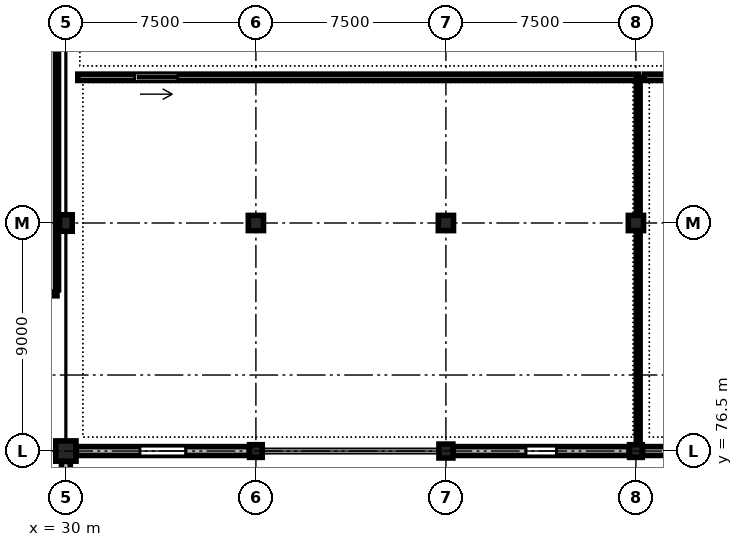
"""IFC4 building model, lengths in metres.
Left out: names, types, materials, properties, quantities, classifications, styles, units other than length and angle.
Written with IfcOpenShell. Run it as: python <this file> out.ifc"""

import sys

from ifc_helpers import new_model, si_unit, direction, frame, frame_2d, origin, origin_2d, place, context, subcontext, project, spatial, rectangle, circle, extrude, element, fill, save


model = new_model("IFC4")
c1 = context("Model", 3, precision=1e-05, world=origin(), true_north=direction((0.0, 1.0)))
c2 = subcontext(c1, "Body", "Model", "MODEL_VIEW")
j1 = project(units=[si_unit("LENGTHUNIT", "METRE"), si_unit("PLANEANGLEUNIT", "RADIAN")], contexts=[c1])
p1 = place(None, origin())
s1 = spatial("IfcSite", under=j1, at=p1, CompositionType="ELEMENT")
p2 = place(p1, origin())
s2 = spatial("IfcBuilding", under=s1, at=p2, CompositionType="ELEMENT")
p3 = place(p2, frame((0.0, 0.0, 9.3)))
s3 = spatial("IfcBuildingStorey", under=s2, at=p3, CompositionType="ELEMENT", Elevation=9.3)
p4 = place(p3, frame((30.0, 76.5, 0.0), z_axis=(0.0, 0.0, 1.0), x_axis=(1.0, 0.0, 0.0)))
e1 = element("IfcColumn", 1, at=p4, inside=s3, PredefinedType="COLUMN", context=c2, shape_type="SweptSolid", body=[
    extrude(rectangle(XDim=0.8, YDim=0.8, at=origin_2d()), origin(), (0.0, 0.0, 1.0), 4.8),
])
p5 = place(p3, frame((30.0, 85.5, 0.0), z_axis=(0.0, 0.0, 1.0), x_axis=(1.0, 0.0, 0.0)))
e2 = element("IfcColumn", 2, at=p5, inside=s3, PredefinedType="COLUMN", context=c2, shape_type="SweptSolid", body=[
    extrude(rectangle(XDim=0.5, YDim=0.65, at=origin_2d()), origin(), (0.0, 0.0, 1.0), 4.8),
])
p6 = place(p3, frame((37.5, 76.5, 0.0), z_axis=(0.0, 0.0, 1.0), x_axis=(1.0, 0.0, 0.0)))
e3 = element("IfcColumn", 3, at=p6, inside=s3, PredefinedType="COLUMN", context=c2, shape_type="SweptSolid", body=[
    extrude(rectangle(XDim=0.5, YDim=0.5, at=origin_2d()), origin(), (0.0, 0.0, 1.0), 4.8),
])
p7 = place(p3, frame((37.5, 85.5, 0.0), z_axis=(0.0, 0.0, 1.0), x_axis=(1.0, 0.0, 0.0)))
e4 = element("IfcColumn", 4, at=p7, inside=s3, PredefinedType="COLUMN", context=c2, shape_type="SweptSolid", body=[
    extrude(rectangle(XDim=0.6, YDim=0.6, at=origin_2d()), origin(), (0.0, 0.0, 1.0), 4.8),
])
p8 = place(p3, frame((45.0, 76.5, 0.0), z_axis=(0.0, 0.0, 1.0), x_axis=(1.0, 0.0, 0.0)))
e5 = element("IfcColumn", 5, at=p8, inside=s3, PredefinedType="COLUMN", context=c2, shape_type="SweptSolid", body=[
    extrude(rectangle(XDim=0.55, YDim=0.55, at=origin_2d()), origin(), (0.0, 0.0, 1.0), 4.8),
])
p9 = place(p3, frame((45.0, 85.5, 0.0), z_axis=(0.0, 0.0, 1.0), x_axis=(1.0, 0.0, 0.0)))
e6 = element("IfcColumn", 6, at=p9, inside=s3, PredefinedType="COLUMN", context=c2, shape_type="SweptSolid", body=[
    extrude(rectangle(XDim=0.6, YDim=0.6, at=origin_2d()), origin(), (0.0, 0.0, 1.0), 4.8),
])
p10 = place(p3, frame((52.5, 76.5, 0.0), z_axis=(0.0, 0.0, 1.0), x_axis=(1.0, 0.0, 0.0)))
e7 = element("IfcColumn", 7, at=p10, inside=s3, PredefinedType="COLUMN", context=c2, shape_type="SweptSolid", body=[
    extrude(rectangle(XDim=0.5, YDim=0.5, at=origin_2d()), origin(), (0.0, 0.0, 1.0), 4.8),
])
p11 = place(p3, frame((52.5, 85.5, 0.0), z_axis=(0.0, 0.0, 1.0), x_axis=(1.0, 0.0, 0.0)))
e8 = element("IfcColumn", 8, at=p11, inside=s3, PredefinedType="COLUMN", context=c2, shape_type="SweptSolid", body=[
    extrude(circle(Radius=0.3, at=origin_2d()), origin(), (0.0, 0.0, 1.0), 4.8),
])
p12 = place(p3, frame((30.0, 76.09, 0.0), z_axis=(0.0, 0.0, 1.0), x_axis=(0.0, -1.0, 0.0)))
e9 = element("IfcWall", 9, at=p12, inside=s3, PredefinedType="STANDARD", context=c2, shape_type="SweptSolid", body=[
    extrude(rectangle(XDim=6.92, YDim=0.35, at=frame_2d((3.46, 0.0))), origin(), (0.0, 0.0, 1.0), 3.95),
])
p13 = place(p12, frame((2.26, 0.0, 0.9)))
e10 = element("IfcOpeningElement", 10, at=p13, cuts=e9, PredefinedType="OPENING", context=c2, shape_type="SweptSolid", body=[
    extrude(rectangle(XDim=2.4, YDim=2.5, at=frame_2d((1.2, 1.25))), frame((0.0, 0.185, 0.0), z_axis=(0.0, -1.0, 0.0), x_axis=(1.0, 0.0, 0.0)), (0.0, 0.0, 1.0), 0.37),
])
p14 = place(p3, frame((37.24, 76.5, 0.0), z_axis=(0.0, 0.0, 1.0), x_axis=(-1.0, 0.0, 0.0)))
e11 = element("IfcWall", 11, at=p14, inside=s3, PredefinedType="STANDARD", context=c2, shape_type="SweptSolid", body=[
    extrude(rectangle(XDim=6.83, YDim=0.35, at=frame_2d((3.415, 0.0))), origin(), (0.0, 0.0, 1.0), 3.95),
])
p15 = place(p14, frame((2.515, 0.0, 0.9)))
e12 = element("IfcOpeningElement", 12, at=p15, cuts=e11, PredefinedType="OPENING", context=c2, shape_type="SweptSolid", body=[
    extrude(rectangle(XDim=1.8, YDim=2.1, at=frame_2d((0.9, 1.05))), frame((0.0, 0.185, 0.0), z_axis=(0.0, -1.0, 0.0), x_axis=(1.0, 0.0, 0.0)), (0.0, 0.0, 1.0), 0.37),
])
p16 = place(p3, frame((52.24, 76.5, 0.0), z_axis=(0.0, 0.0, 1.0), x_axis=(-1.0, 0.0, 0.0)))
e13 = element("IfcWall", 13, at=p16, inside=s3, PredefinedType="STANDARD", context=c2, shape_type="SweptSolid", body=[
    extrude(rectangle(XDim=6.955, YDim=0.35, at=frame_2d((3.478, 0.0))), origin(), (0.0, 0.0, 1.0), 3.95),
])
p17 = place(p16, frame((2.877, 0.0, 0.9)))
e14 = element("IfcOpeningElement", 14, at=p17, cuts=e13, PredefinedType="OPENING", context=c2, shape_type="SweptSolid", body=[
    extrude(rectangle(XDim=1.2, YDim=2.1, at=frame_2d((0.6, 1.05))), frame((0.0, 0.185, 0.0), z_axis=(0.0, -1.0, 0.0), x_axis=(1.0, 0.0, 0.0)), (0.0, 0.0, 1.0), 0.37),
])
p18 = place(p3, frame((59.715, 76.5, 0.0), z_axis=(0.0, 0.0, 1.0), x_axis=(-1.0, 0.0, 0.0)))
e15 = element("IfcWall", 15, at=p18, inside=s3, PredefinedType="STANDARD", context=c2, shape_type="SweptSolid", body=[
    extrude(rectangle(XDim=6.955, YDim=0.35, at=frame_2d((3.478, 0.0))), origin(), (0.0, 0.0, 1.0), 3.95),
])
p19 = place(p18, frame((2.427, 0.0, 0.9)))
e16 = element("IfcOpeningElement", 16, at=p19, cuts=e15, PredefinedType="OPENING", context=c2, shape_type="SweptSolid", body=[
    extrude(rectangle(XDim=2.1, YDim=2.1, at=frame_2d((1.05, 1.05))), frame((0.0, 0.185, 0.0), z_axis=(0.0, -1.0, 0.0), x_axis=(1.0, 0.0, 0.0)), (0.0, 0.0, 1.0), 0.37),
])
p20 = place(p3, frame((52.59, 91.25, 0.0), z_axis=(0.0, 0.0, 1.0), x_axis=(-1.0, 0.0, 0.0)))
e17 = element("IfcWall", 17, at=p20, inside=s3, PredefinedType="STANDARD", context=c2, shape_type="SweptSolid", body=[
    extrude(rectangle(XDim=22.12, YDim=0.25, at=frame_2d((11.06, 0.0))), origin(), (0.0, 0.0, 1.0), 4.535),
])
p21 = place(p20, frame((18.178, 0.0, 0.0)))
e18 = element("IfcOpeningElement", 18, at=p21, cuts=e17, PredefinedType="OPENING", context=c2, shape_type="SweptSolid", body=[
    extrude(rectangle(XDim=1.7, YDim=2.4, at=frame_2d((0.85, 1.2))), frame((0.0, 0.135, 0.0), z_axis=(0.0, -1.0, 0.0), x_axis=(1.0, 0.0, 0.0)), (0.0, 0.0, 1.0), 0.27),
])
p22 = place(p3, frame((74.95, 91.25, 0.0), z_axis=(0.0, 0.0, 1.0), x_axis=(-1.0, 0.0, 0.0)))
e19 = element("IfcWall", 19, at=p22, inside=s3, PredefinedType="STANDARD", context=c2, shape_type="SweptSolid", body=[
    extrude(rectangle(XDim=22.12, YDim=0.25, at=frame_2d((11.06, 0.0))), origin(), (0.0, 0.0, 1.0), 4.535),
])
p23 = place(p22, frame((10.21, 0.0, 0.0)))
e20 = element("IfcOpeningElement", 20, at=p23, cuts=e19, PredefinedType="OPENING", context=c2, shape_type="SweptSolid", body=[
    extrude(rectangle(XDim=1.7, YDim=2.4, at=frame_2d((0.85, 1.2))), frame((0.0, 0.135, 0.0), z_axis=(0.0, -1.0, 0.0), x_axis=(1.0, 0.0, 0.0)), (0.0, 0.0, 1.0), 0.27),
])
p24 = place(p3, frame((18.45, 82.701, 0.0), z_axis=(0.0, 0.0, 1.0), x_axis=(1.0, 0.0, 0.0)))
e21 = element("IfcWall", 21, at=p24, inside=s3, PredefinedType="PARTITIONING", context=c2, shape_type="SweptSolid", body=[
    extrude(rectangle(XDim=11.2, YDim=0.15, at=frame_2d((5.6, 0.0))), origin(), (0.0, 0.0, 1.0), 4.535),
])
p25 = place(p3, frame((52.59, 76.85, 0.0), z_axis=(0.0, 0.0, 1.0), x_axis=(0.0, 1.0, 0.0)))
e22 = element("IfcWall", 22, at=p25, inside=s3, PredefinedType="PARTITIONING", context=c2, shape_type="SweptSolid", body=[
    extrude(rectangle(XDim=14.4, YDim=0.15, at=frame_2d((7.2, 0.0))), origin(), (0.0, 0.0, 1.0), 3.835),
])
p26 = place(p3, frame((29.65, 82.861, 0.0), z_axis=(0.0, 0.0, 1.0), x_axis=(0.0, 1.0, 0.0)))
e23 = element("IfcWall", 23, at=p26, inside=s3, PredefinedType="PARTITIONING", context=c2, shape_type="SweptSolid", body=[
    extrude(rectangle(XDim=9.709, YDim=0.12, at=frame_2d((4.854, 0.0))), origin(), (0.0, 0.0, 1.0), 3.835),
])
p27 = place(p15, origin())
e24 = element("IfcWindow", 24, at=p27, inside=s3, PartitioningType="SINGLE_PANEL", PredefinedType="WINDOW", context=c2, shape_type="SweptSolid", body=[
    extrude(rectangle(XDim=1.8, YDim=2.1, at=frame_2d((0.9, 1.05))), frame((0.0, 0.03, 0.0), z_axis=(0.0, -1.0, 0.0), x_axis=(1.0, 0.0, 0.0)), (0.0, 0.0, 1.0), 0.06),
])
fill(e12, e24)
p28 = place(p17, origin())
e25 = element("IfcWindow", 25, at=p28, inside=s3, PartitioningType="SINGLE_PANEL", PredefinedType="WINDOW", context=c2, shape_type="SweptSolid", body=[
    extrude(rectangle(XDim=1.2, YDim=2.1, at=frame_2d((0.6, 1.05))), frame((0.0, 0.03, 0.0), z_axis=(0.0, -1.0, 0.0), x_axis=(1.0, 0.0, 0.0)), (0.0, 0.0, 1.0), 0.06),
])
fill(e14, e25)
p29 = place(p21, origin())
e26 = element("IfcDoor", 26, at=p29, inside=s3, OperationType="DOUBLE_DOOR_SLIDING", PredefinedType="DOOR", context=c2, shape_type="SweptSolid", body=[
    extrude(rectangle(XDim=1.7, YDim=2.4, at=frame_2d((0.85, 1.2))), frame((0.0, 0.025, 0.0), z_axis=(0.0, -1.0, 0.0), x_axis=(1.0, 0.0, 0.0)), (0.0, 0.0, 1.0), 0.05),
])
fill(e18, e26)
save(model, sys.argv[1])
